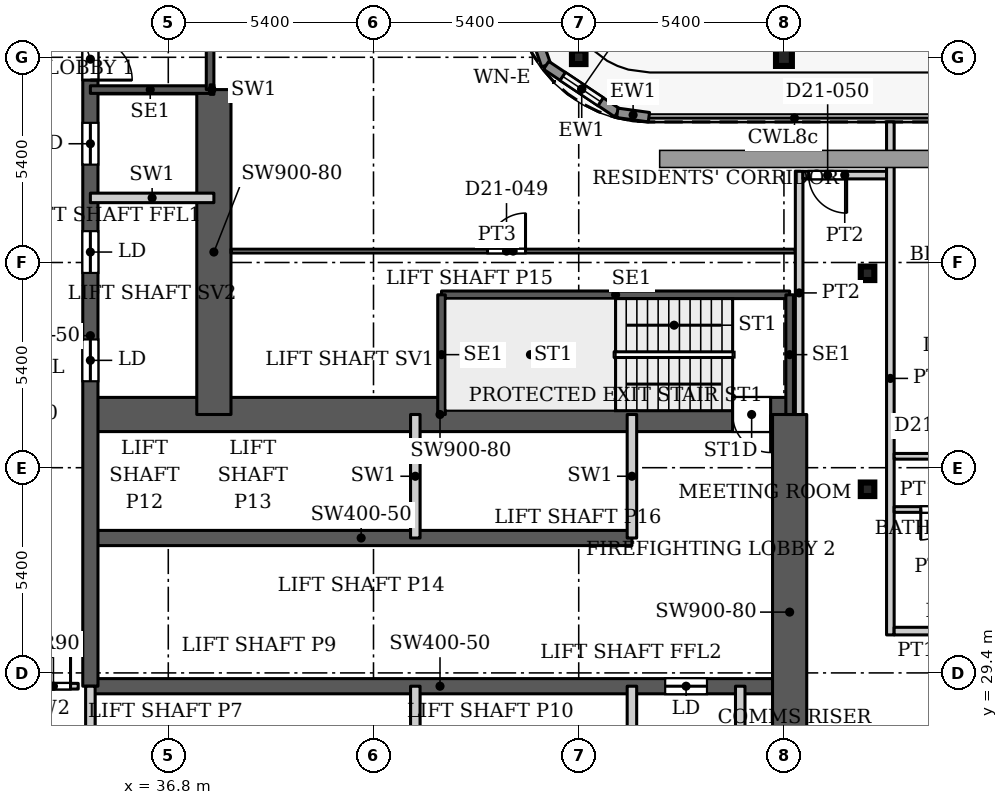
"""IFC4 building model, lengths in metres.
Left out: names, types, materials, properties, quantities, classifications, styles, units other than length and angle.
Written with IfcOpenShell. Run it as: python <this file> out.ifc"""

import sys

from ifc_helpers import new_model, si_unit, direction, frame, frame_2d, origin, origin_2d, place, context, subcontext, project, spatial, rectangle, hollow_rectangle, i_section, extrude, source, transform, mapped, element, fill, save


model = new_model("IFC4")
c1 = context("Model", 3, precision=1e-05, world=origin(), true_north=direction((0.0, 1.0)))
c2 = subcontext(c1, "Body", "Model", "MODEL_VIEW")
j1 = project(units=[si_unit("LENGTHUNIT", "METRE"), si_unit("PLANEANGLEUNIT", "RADIAN")], contexts=[c1])
p1 = place(None, origin())
s1 = spatial("IfcSite", under=j1, at=p1, CompositionType="ELEMENT")
p2 = place(p1, origin())
s2 = spatial("IfcBuilding", under=s1, at=p2, CompositionType="ELEMENT")
p3 = place(p2, frame((0.0, 0.0, 94.1)))
s3 = spatial("IfcBuildingStorey", under=s2, at=p3, CompositionType="ELEMENT", Elevation=94.1)
p4 = place(p3, frame((53.0, 45.6, 0.0), z_axis=(0.0, 0.0, 1.0), x_axis=(1.0, 0.0, 0.0)))
e1 = element("IfcColumn", 1, at=p4, inside=s3, PredefinedType="COLUMN", context=c2, shape_type="SweptSolid", body=[
    extrude(i_section(OverallWidth=0.418, OverallDepth=0.455, WebThickness=0.042, FlangeThickness=0.068, FilletRadius=0.014, at=origin_2d()), origin(), (0.0, 0.0, 1.0), 3.9),
])
for number, where, z_axis, x_axis in (
    (2, (55.2, 34.232, 0.0), (0.0, 0.0, 1.0), (1.0, 0.0, 0.0)),
    (3, (55.2, 39.916, 0.0), (0.0, 0.0, 1.0), (1.0, 0.0, 0.0)),
    (4, (47.6, 45.6, 0.0), (0.0, 0.0, 1.0), (1.0, 0.0, 0.0)),
):
    element("IfcColumn", number, at=place(p3, frame(where, z_axis=z_axis, x_axis=x_axis)), inside=s3, PredefinedType="COLUMN", context=c2, shape_type="SweptSolid", body=[
        extrude(hollow_rectangle(XDim=0.356, YDim=0.356, WallThickness=0.016, InnerFilletRadius=0.016, OuterFilletRadius=0.032, at=origin_2d()), origin(), (0.0, 0.0, 1.0), 3.9),
    ])
p5 = place(p3, frame((34.75, 29.05, 0.0), z_axis=(0.0, 0.0, 1.0), x_axis=(1.0, 0.0, 0.0)))
e5 = element("IfcWall", 5, at=p5, inside=s3, PredefinedType="SHEAR", context=c2, shape_type="SweptSolid", body=[
    extrude(rectangle(XDim=18.4, YDim=0.4, at=frame_2d((9.2, 0.0))), origin(), (0.0, 0.0, 1.0), 3.9),
])
p6 = place(p5, frame((15.125, 0.0, 0.0)))
e6 = element("IfcOpeningElement", 6, at=p6, cuts=e5, PredefinedType="OPENING", context=c2, shape_type="SweptSolid", body=[
    extrude(rectangle(XDim=1.1, YDim=2.2, at=frame_2d((0.55, 1.1))), frame((0.0, 0.21, 0.0), z_axis=(0.0, -1.0, 0.0), x_axis=(1.0, 0.0, 0.0)), (0.0, 0.0, 1.0), 0.42),
])
p7 = place(p3, frame((34.75, 32.95, 0.0), z_axis=(0.0, 0.0, 1.0), x_axis=(1.0, 0.0, 0.0)))
e7 = element("IfcWall", 7, at=p7, inside=s3, PredefinedType="SHEAR", context=c2, shape_type="SweptSolid", body=[
    extrude(rectangle(XDim=14.25, YDim=0.4, at=frame_2d((7.125, 0.0))), origin(), (0.0, 0.0, 1.0), 3.9),
])
p8 = place(p3, frame((34.75, 36.2, 0.0), z_axis=(0.0, 0.0, 1.0), x_axis=(1.0, 0.0, 0.0)))
e8 = element("IfcWall", 8, at=p8, inside=s3, PredefinedType="SHEAR", context=c2, shape_type="SweptSolid", body=[
    extrude(rectangle(XDim=18.4, YDim=0.9, at=frame_2d((9.2, 0.0))), origin(), (0.0, 0.0, 1.0), 3.9),
])
p9 = place(p8, frame((16.9, 0.0, 0.0)))
e9 = element("IfcOpeningElement", 9, at=p9, cuts=e8, PredefinedType="OPENING", context=c2, shape_type="SweptSolid", body=[
    extrude(rectangle(XDim=1.0, YDim=2.2, at=frame_2d((0.5, 1.1))), frame((0.0, 0.46, 0.0), z_axis=(0.0, -1.0, 0.0), x_axis=(1.0, 0.0, 0.0)), (0.0, 0.0, 1.0), 0.92),
])
p10 = place(p3, frame((34.75, 29.05, 0.0), z_axis=(0.0, 0.0, 1.0), x_axis=(0.0, 1.0, 0.0)))
e10 = element("IfcWall", 10, at=p10, inside=s3, PredefinedType="SHEAR", context=c2, shape_type="SweptSolid", body=[
    extrude(rectangle(XDim=18.45, YDim=0.4, at=frame_2d((9.225, 0.0))), origin(), (0.0, 0.0, 1.0), 3.9),
])
p11 = place(p10, frame((8.025, 0.0, 0.0)))
e11 = element("IfcOpeningElement", 11, at=p11, cuts=e10, PredefinedType="OPENING", context=c2, shape_type="SweptSolid", body=[
    extrude(rectangle(XDim=1.1, YDim=2.2, at=frame_2d((0.55, 1.1))), frame((0.0, 0.21, 0.0), z_axis=(0.0, -1.0, 0.0), x_axis=(1.0, 0.0, 0.0)), (0.0, 0.0, 1.0), 0.42),
])
p12 = place(p10, frame((10.875, 0.0, 0.0)))
e12 = element("IfcOpeningElement", 12, at=p12, cuts=e10, PredefinedType="OPENING", context=c2, shape_type="SweptSolid", body=[
    extrude(rectangle(XDim=1.1, YDim=2.2, at=frame_2d((0.55, 1.1))), frame((0.0, 0.21, 0.0), z_axis=(0.0, -1.0, 0.0), x_axis=(1.0, 0.0, 0.0)), (0.0, 0.0, 1.0), 0.42),
])
p13 = place(p10, frame((13.725, 0.0, 0.0)))
e13 = element("IfcOpeningElement", 13, at=p13, cuts=e10, PredefinedType="OPENING", context=c2, shape_type="SweptSolid", body=[
    extrude(rectangle(XDim=1.1, YDim=2.2, at=frame_2d((0.55, 1.1))), frame((0.0, 0.21, 0.0), z_axis=(0.0, -1.0, 0.0), x_axis=(1.0, 0.0, 0.0)), (0.0, 0.0, 1.0), 0.42),
])
p14 = place(p10, frame((15.95, 0.0, 0.0)))
e14 = element("IfcOpeningElement", 14, at=p14, cuts=e10, PredefinedType="OPENING", context=c2, shape_type="SweptSolid", body=[
    extrude(rectangle(XDim=1.1, YDim=2.2, at=frame_2d((0.55, 1.1))), frame((0.0, 0.21, 0.0), z_axis=(0.0, -1.0, 0.0), x_axis=(1.0, 0.0, 0.0)), (0.0, 0.0, 1.0), 0.42),
])
p15 = place(p3, frame((38.0, 36.2, 0.0), z_axis=(0.0, 0.0, 1.0), x_axis=(0.0, 1.0, 0.0)))
e15 = element("IfcWall", 15, at=p15, inside=s3, PredefinedType="SHEAR", context=c2, shape_type="SweptSolid", body=[
    extrude(rectangle(XDim=8.55, YDim=0.9, at=frame_2d((4.275, 0.0))), origin(), (0.0, 0.0, 1.0), 3.9),
])
p16 = place(p3, frame((53.15, 25.8, 0.0), z_axis=(0.0, 0.0, 1.0), x_axis=(0.0, 1.0, 0.0)))
e16 = element("IfcWall", 16, at=p16, inside=s3, PredefinedType="SHEAR", context=c2, shape_type="SweptSolid", body=[
    extrude(rectangle(XDim=10.4, YDim=0.9, at=frame_2d((5.2, 0.0))), origin(), (0.0, 0.0, 1.0), 3.9),
])
p17 = place(p3, frame((46.018, 47.471, 0.0), z_axis=(0.0, 0.0, 1.0), x_axis=(0.328791208903, -0.944402637093, 0.0)))
e17 = element("IfcWall", 17, at=p17, inside=s3, PredefinedType="SOLIDWALL", context=c2, shape_type="SweptSolid", body=[
    extrude(rectangle(XDim=2.205, YDim=0.25, at=frame_2d((1.102, 0.0))), origin(), (0.0, 0.0, 1.0), 3.75),
])
p18 = place(p17, frame((0.503, 0.0, 0.6)))
e18 = element("IfcOpeningElement", 18, at=p18, cuts=e17, PredefinedType="OPENING", context=c2, shape_type="SweptSolid", body=[
    extrude(rectangle(XDim=1.2, YDim=2.1, at=frame_2d((0.6, 1.05))), frame((0.0, 0.135, 0.0), z_axis=(0.0, -1.0, 0.0), x_axis=(1.0, 0.0, 0.0)), (0.0, 0.0, 1.0), 0.27),
])
p19 = place(p3, frame((46.743, 45.389, 0.0), z_axis=(0.0, 0.0, 1.0), x_axis=(0.831449265529, -0.555600682912, 0.0)))
e19 = element("IfcWall", 19, at=p19, inside=s3, PredefinedType="SOLIDWALL", context=c2, shape_type="SweptSolid", body=[
    extrude(rectangle(XDim=2.251, YDim=0.25, at=frame_2d((1.126, 0.0))), origin(), (0.0, 0.0, 1.0), 3.75),
])
p20 = place(p19, frame((0.525, 0.0, 0.6)))
e20 = element("IfcOpeningElement", 20, at=p20, cuts=e19, PredefinedType="OPENING", context=c2, shape_type="SweptSolid", body=[
    extrude(rectangle(XDim=1.2, YDim=2.1, at=frame_2d((0.6, 1.05))), frame((0.0, 0.135, 0.0), z_axis=(0.0, -1.0, 0.0), x_axis=(1.0, 0.0, 0.0)), (0.0, 0.0, 1.0), 0.27),
])
p21 = place(p3, frame((48.615, 44.138, 0.0), z_axis=(0.0, 0.0, 1.0), x_axis=(0.990741504246, -0.135761819977, 0.0)))
e21 = element("IfcWall", 21, at=p21, inside=s3, PredefinedType="SOLIDWALL", context=c2, shape_type="SweptSolid", body=[
    extrude(rectangle(XDim=0.84, YDim=0.25, at=frame_2d((0.42, 0.0))), origin(), (0.0, 0.0, 1.0), 3.75),
])
p22 = place(p3, frame((43.99, 39.35, 0.0), z_axis=(0.0, 0.0, 1.0), x_axis=(1.0, 0.0, 0.0)))
e22 = element("IfcWall", 22, at=p22, inside=s3, PredefinedType="SHEAR", context=c2, shape_type="SweptSolid", body=[
    extrude(rectangle(XDim=9.16, YDim=0.2, at=frame_2d((4.58, 0.0))), origin(), (0.0, 0.0, 1.0), 3.9),
])
for number, where, z_axis, x_axis in (
    (23, (43.99, 36.2, 0.0), (0.0, 0.0, 1.0), (0.0, 1.0, 0.0)),
    (24, (53.15, 36.2, 0.0), (0.0, 0.0, 1.0), (0.0, 1.0, 0.0)),
):
    element("IfcWall", number, at=place(p3, frame(where, z_axis=z_axis, x_axis=x_axis)), inside=s3, PredefinedType="SHEAR", context=c2, shape_type="SweptSolid", body=[
        extrude(rectangle(XDim=3.15, YDim=0.2, at=frame_2d((1.575, 0.0))), origin(), (0.0, 0.0, 1.0), 3.9),
    ])
p23 = place(p3, frame((34.75, 44.75, 0.0), z_axis=(0.0, 0.0, 1.0), x_axis=(1.0, 0.0, 0.0)))
e25 = element("IfcWall", 25, at=p23, inside=s3, PredefinedType="SHEAR", context=c2, shape_type="SweptSolid", body=[
    extrude(rectangle(XDim=3.15, YDim=0.2, at=frame_2d((1.575, 0.0))), origin(), (0.0, 0.0, 1.0), 3.9),
])
p24 = place(p3, frame((37.9, 44.75, 0.0), z_axis=(0.0, 0.0, 1.0), x_axis=(0.0, 1.0, 0.0)))
e26 = element("IfcWall", 26, at=p24, inside=s3, PredefinedType="SHEAR", context=c2, shape_type="SweptSolid", body=[
    extrude(rectangle(XDim=9.16, YDim=0.2, at=frame_2d((4.58, 0.0))), origin(), (0.0, 0.0, 1.0), 3.9),
])
for number, where, z_axis, x_axis in (
    (27, (34.75, 25.8, 0.0), (0.0, 0.0, 1.0), (0.0, 1.0, 0.0)),
    (28, (43.3, 25.8, 0.0), (0.0, 0.0, 1.0), (0.0, 1.0, 0.0)),
    (29, (43.3, 32.95, 0.0), (0.0, 0.0, 1.0), (0.0, 1.0, 0.0)),
    (30, (49.0, 25.8, 0.0), (0.0, 0.0, 1.0), (0.0, 1.0, 0.0)),
    (31, (49.0, 32.95, 0.0), (0.0, 0.0, 1.0), (0.0, 1.0, 0.0)),
    (32, (51.85, 25.8, 0.0), (0.0, 0.0, 1.0), (0.0, 1.0, 0.0)),
    (33, (34.75, 41.9, 0.0), (0.0, 0.0, 1.0), (1.0, 0.0, 0.0)),
):
    element("IfcWall", number, at=place(p3, frame(where, z_axis=z_axis, x_axis=x_axis)), inside=s3, PredefinedType="PARTITIONING", context=c2, shape_type="SweptSolid", body=[
        extrude(rectangle(XDim=3.25, YDim=0.25, at=frame_2d((1.625, 0.0))), origin(), (0.0, 0.0, 1.0), 3.9),
    ])
p25 = place(p3, frame((37.9, 44.75, 0.0), z_axis=(0.0, 0.0, 1.0), x_axis=(1.0, 0.0, 0.0)))
e34 = element("IfcWall", 34, at=p25, inside=s3, PredefinedType="PARTITIONING", context=c2, shape_type="SweptSolid", body=[
    extrude(rectangle(XDim=0.1, YDim=0.25, at=frame_2d((0.05, 0.0))), origin(), (0.0, 0.0, 1.0), 3.9),
])
p26 = place(p3, frame((32.805, 29.05, 0.0), z_axis=(0.0, 0.0, 1.0), x_axis=(1.0, 0.0, 0.0)))
e35 = element("IfcWall", 35, at=p26, inside=s3, PredefinedType="PARTITIONING", context=c2, shape_type="SweptSolid", body=[
    extrude(rectangle(XDim=1.625, YDim=0.15, at=frame_2d((0.812, 0.0))), origin(), (0.0, 0.0, 1.0), 3.9),
])
p27 = place(p26, frame((0.523, 0.0, 0.0)))
e36 = element("IfcOpeningElement", 36, at=p27, cuts=e35, PredefinedType="OPENING", context=c2, shape_type="SweptSolid", body=[
    extrude(rectangle(XDim=0.9, YDim=2.2, at=frame_2d((0.45, 1.1))), frame((0.0, 0.085, 0.0), z_axis=(0.0, -1.0, 0.0), x_axis=(1.0, 0.0, 0.0)), (0.0, 0.0, 1.0), 0.17),
])
p28 = place(p3, frame((38.449, 40.5, 0.0), z_axis=(0.0, 0.0, 1.0), x_axis=(1.0, 0.0, 0.0)))
e37 = element("IfcWall", 37, at=p28, inside=s3, PredefinedType="PARTITIONING", context=c2, shape_type="SweptSolid", body=[
    extrude(rectangle(XDim=14.851, YDim=0.1, at=frame_2d((7.426, 0.0))), origin(), (0.0, 0.0, 1.0), 3.6),
])
p29 = place(p28, frame((6.751, 0.0, 0.0)))
e38 = element("IfcOpeningElement", 38, at=p29, cuts=e37, PredefinedType="OPENING", context=c2, shape_type="SweptSolid", body=[
    extrude(rectangle(XDim=1.0, YDim=2.1, at=frame_2d((0.5, 1.05))), frame((0.0, 0.06, 0.0), z_axis=(0.0, -1.0, 0.0), x_axis=(1.0, 0.0, 0.0)), (0.0, 0.0, 1.0), 0.12),
])
p30 = place(p3, frame((53.4, 36.199, 0.0), z_axis=(0.0, 0.0, 1.0), x_axis=(0.0, 1.0, 0.0)))
e39 = element("IfcWall", 39, at=p30, inside=s3, PredefinedType="PARTITIONING", context=c2, shape_type="SweptSolid", body=[
    extrude(rectangle(XDim=6.401, YDim=0.2, at=frame_2d((3.201, 0.0))), origin(), (0.0, 0.0, 1.0), 3.6),
])
p31 = place(p3, frame((53.5, 42.5, 0.0), z_axis=(0.0, 0.0, 1.0), x_axis=(1.0, 0.0, 0.0)))
e40 = element("IfcWall", 40, at=p31, inside=s3, PredefinedType="PARTITIONING", context=c2, shape_type="SweptSolid", body=[
    extrude(rectangle(XDim=2.2, YDim=0.2, at=frame_2d((1.1, 0.0))), origin(), (0.0, 0.0, 1.0), 3.6),
])
p32 = place(p31, frame((0.15, 0.0, 0.0)))
e41 = element("IfcOpeningElement", 41, at=p32, cuts=e40, PredefinedType="OPENING", context=c2, shape_type="SweptSolid", body=[
    extrude(rectangle(XDim=1.0, YDim=2.1, at=frame_2d((0.5, 1.05))), frame((0.0, 0.11, 0.0), z_axis=(0.0, -1.0, 0.0), x_axis=(1.0, 0.0, 0.0)), (0.0, 0.0, 1.0), 0.22),
])
p33 = place(p3, frame((55.8, 30.4, 0.0), z_axis=(0.0, 0.0, 1.0), x_axis=(0.0, 1.0, 0.0)))
e42 = element("IfcWall", 42, at=p33, inside=s3, PredefinedType="PARTITIONING", context=c2, shape_type="SweptSolid", body=[
    extrude(rectangle(XDim=13.5, YDim=0.2, at=frame_2d((6.75, 0.0))), origin(), (0.0, 0.0, 1.0), 3.6),
])
p34 = place(p3, frame((55.9, 30.5, 0.0), z_axis=(0.0, 0.0, 1.0), x_axis=(1.0, 0.0, 0.0)))
e43 = element("IfcWall", 43, at=p34, inside=s3, PredefinedType="PARTITIONING", context=c2, shape_type="SweptSolid", body=[
    extrude(rectangle(XDim=42.2, YDim=0.2, at=frame_2d((21.1, 0.0))), origin(), (0.0, 0.0, 1.0), 3.6),
])
p35 = place(p34, frame((2.7, 0.0, 0.0)))
e44 = element("IfcOpeningElement", 44, at=p35, cuts=e43, PredefinedType="OPENING", context=c2, shape_type="SweptSolid", body=[
    extrude(rectangle(XDim=1.0, YDim=2.1, at=frame_2d((0.5, 1.05))), frame((0.0, 0.11, 0.0), z_axis=(0.0, -1.0, 0.0), x_axis=(1.0, 0.0, 0.0)), (0.0, 0.0, 1.0), 0.22),
])
p36 = place(p34, frame((15.3, 0.0, 0.0)))
e45 = element("IfcOpeningElement", 45, at=p36, cuts=e43, PredefinedType="OPENING", context=c2, shape_type="SweptSolid", body=[
    extrude(rectangle(XDim=1.0, YDim=2.1, at=frame_2d((0.5, 1.05))), frame((0.0, 0.11, 0.0), z_axis=(0.0, -1.0, 0.0), x_axis=(1.0, 0.0, 0.0)), (0.0, 0.0, 1.0), 0.22),
])
p37 = place(p34, frame((33.3, 0.0, 0.0)))
e46 = element("IfcOpeningElement", 46, at=p37, cuts=e43, PredefinedType="OPENING", context=c2, shape_type="SweptSolid", body=[
    extrude(rectangle(XDim=1.0, YDim=2.1, at=frame_2d((0.5, 1.05))), frame((0.0, 0.11, 0.0), z_axis=(0.0, -1.0, 0.0), x_axis=(1.0, 0.0, 0.0)), (0.0, 0.0, 1.0), 0.22),
])
p38 = place(p3, frame((55.9, 33.7, 0.0), z_axis=(0.0, 0.0, 1.0), x_axis=(1.0, 0.0, 0.0)))
e47 = element("IfcWall", 47, at=p38, inside=s3, PredefinedType="PARTITIONING", context=c2, shape_type="SweptSolid", body=[
    extrude(rectangle(XDim=2.225, YDim=0.15, at=frame_2d((1.113, 0.0))), origin(), (0.0, 0.0, 1.0), 3.6),
])
p39 = place(p38, frame((0.7, 0.0, 0.0)))
e48 = element("IfcOpeningElement", 48, at=p39, cuts=e47, PredefinedType="OPENING", context=c2, shape_type="SweptSolid", body=[
    extrude(rectangle(XDim=0.8, YDim=2.1, at=frame_2d((0.4, 1.05))), frame((0.0, 0.085, 0.0), z_axis=(0.0, -1.0, 0.0), x_axis=(1.0, 0.0, 0.0)), (0.0, 0.0, 1.0), 0.17),
])
p40 = place(p3, frame((55.9, 35.1, 0.0), z_axis=(0.0, 0.0, 1.0), x_axis=(1.0, 0.0, 0.0)))
e49 = element("IfcWall", 49, at=p40, inside=s3, PredefinedType="PARTITIONING", context=c2, shape_type="SweptSolid", body=[
    extrude(rectangle(XDim=11.2, YDim=0.15, at=frame_2d((5.6, 0.0))), origin(), (0.0, 0.0, 1.0), 3.6),
])
p41 = place(p40, frame((1.4, 0.0, 0.0)))
e50 = element("IfcOpeningElement", 50, at=p41, cuts=e49, PredefinedType="OPENING", context=c2, shape_type="SweptSolid", body=[
    extrude(rectangle(XDim=0.9, YDim=2.1, at=frame_2d((0.45, 1.05))), frame((0.0, 0.085, 0.0), z_axis=(0.0, -1.0, 0.0), x_axis=(1.0, 0.0, 0.0)), (0.0, 0.0, 1.0), 0.17),
])
p42 = place(p40, frame((5.1, 0.0, 0.0)))
e51 = element("IfcOpeningElement", 51, at=p42, cuts=e49, PredefinedType="OPENING", context=c2, shape_type="SweptSolid", body=[
    extrude(rectangle(XDim=1.0, YDim=2.1, at=frame_2d((0.5, 1.05))), frame((0.0, 0.085, 0.0), z_axis=(0.0, -1.0, 0.0), x_axis=(1.0, 0.0, 0.0)), (0.0, 0.0, 1.0), 0.17),
])
p43 = place(p40, frame((7.85, 0.0, 0.0)))
e52 = element("IfcOpeningElement", 52, at=p43, cuts=e49, PredefinedType="OPENING", context=c2, shape_type="SweptSolid", body=[
    extrude(rectangle(XDim=0.9, YDim=2.1, at=frame_2d((0.45, 1.05))), frame((0.0, 0.085, 0.0), z_axis=(0.0, -1.0, 0.0), x_axis=(1.0, 0.0, 0.0)), (0.0, 0.0, 1.0), 0.17),
])
m1 = source(origin(), c2, "Body", "SweptSolid", [
    extrude(rectangle(XDim=1.2, YDim=2.1, at=frame_2d((0.6, 1.05))), frame((0.0, 0.03, 0.0), z_axis=(0.0, -1.0, 0.0), x_axis=(1.0, 0.0, 0.0)), (0.0, 0.0, 1.0), 0.06),
])
p44 = place(p20, origin())
e53 = element("IfcWindow", 53, at=p44, inside=s3, PartitioningType="SINGLE_PANEL", PredefinedType="WINDOW", context=c2, shape_type="MappedRepresentation", body=[
    mapped(m1, transform((0.0, 0.0, 0.0), x_axis=(1.0, 0.0, 0.0), y_axis=(0.0, 1.0, 0.0), z_axis=(0.0, 0.0, 1.0), scale=1.0)),
])
fill(e20, e53)
m2 = source(origin(), c2, "Body", "SweptSolid", [
    extrude(rectangle(XDim=1.1, YDim=2.2, at=frame_2d((0.55, 1.1))), frame((0.0, 0.025, 0.0), z_axis=(0.0, -1.0, 0.0), x_axis=(1.0, 0.0, 0.0)), (0.0, 0.0, 1.0), 0.05),
])
p45 = place(p11, origin())
e54 = element("IfcDoor", 54, at=p45, inside=s3, OperationType="SLIDING_TO_LEFT", PredefinedType="DOOR", context=c2, shape_type="MappedRepresentation", body=[
    mapped(m2, transform((0.0, 0.0, 0.0), x_axis=(1.0, 0.0, 0.0), y_axis=(0.0, 1.0, 0.0), z_axis=(0.0, 0.0, 1.0), scale=1.0)),
])
fill(e11, e54)
p46 = place(p12, origin())
e55 = element("IfcDoor", 55, at=p46, inside=s3, OperationType="SLIDING_TO_LEFT", PredefinedType="DOOR", context=c2, shape_type="MappedRepresentation", body=[
    mapped(m2, transform((0.0, 0.0, 0.0), x_axis=(1.0, 0.0, 0.0), y_axis=(0.0, 1.0, 0.0), z_axis=(0.0, 0.0, 1.0), scale=1.0)),
])
fill(e12, e55)
p47 = place(p13, origin())
e56 = element("IfcDoor", 56, at=p47, inside=s3, OperationType="SLIDING_TO_LEFT", PredefinedType="DOOR", context=c2, shape_type="MappedRepresentation", body=[
    mapped(m2, transform((0.0, 0.0, 0.0), x_axis=(1.0, 0.0, 0.0), y_axis=(0.0, 1.0, 0.0), z_axis=(0.0, 0.0, 1.0), scale=1.0)),
])
fill(e13, e56)
p48 = place(p6, origin())
e57 = element("IfcDoor", 57, at=p48, inside=s3, OperationType="SLIDING_TO_LEFT", PredefinedType="DOOR", context=c2, shape_type="MappedRepresentation", body=[
    mapped(m2, transform((0.0, 0.0, 0.0), x_axis=(1.0, 0.0, 0.0), y_axis=(0.0, 1.0, 0.0), z_axis=(0.0, 0.0, 1.0), scale=1.0)),
])
fill(e6, e57)
m3 = source(origin(), c2, "Body", "SweptSolid", [
    extrude(rectangle(XDim=0.9, YDim=2.2, at=frame_2d((0.45, 1.1))), frame((0.0, 0.025, 0.0), z_axis=(0.0, -1.0, 0.0), x_axis=(1.0, 0.0, 0.0)), (0.0, 0.0, 1.0), 0.05),
])
p49 = place(p27, origin())
e58 = element("IfcDoor", 58, at=p49, inside=s3, OperationType="SINGLE_SWING_LEFT", PredefinedType="DOOR", context=c2, shape_type="MappedRepresentation", body=[
    mapped(m3, transform((0.0, 0.0, 0.0), x_axis=(1.0, 0.0, 0.0), y_axis=(0.0, 1.0, 0.0), z_axis=(0.0, 0.0, 1.0), scale=1.0)),
])
fill(e36, e58)
m4 = source(origin(), c2, "Body", "SweptSolid", [
    extrude(rectangle(XDim=1.0, YDim=2.2, at=frame_2d((0.5, 1.1))), frame((0.0, 0.025, 0.0), z_axis=(0.0, -1.0, 0.0), x_axis=(1.0, 0.0, 0.0)), (0.0, 0.0, 1.0), 0.05),
])
p50 = place(p9, origin())
e59 = element("IfcDoor", 59, at=p50, inside=s3, OperationType="SINGLE_SWING_RIGHT", PredefinedType="DOOR", context=c2, shape_type="MappedRepresentation", body=[
    mapped(m4, transform((0.0, 0.0, 0.0), x_axis=(1.0, 0.0, 0.0), y_axis=(0.0, 1.0, 0.0), z_axis=(0.0, 0.0, 1.0), scale=1.0)),
])
fill(e9, e59)
m5 = source(origin(), c2, "Body", "SweptSolid", [
    extrude(rectangle(XDim=1.1, YDim=2.2, at=frame_2d((0.55, 1.1))), frame((0.0, 0.025, 0.0), z_axis=(0.0, -1.0, 0.0), x_axis=(1.0, 0.0, 0.0)), (0.0, 0.0, 1.0), 0.05),
])
p51 = place(p14, origin())
e60 = element("IfcDoor", 60, at=p51, inside=s3, OperationType="SINGLE_SWING_RIGHT", PredefinedType="DOOR", context=c2, shape_type="MappedRepresentation", body=[
    mapped(m5, transform((0.0, 0.0, 0.0), x_axis=(1.0, 0.0, 0.0), y_axis=(0.0, 1.0, 0.0), z_axis=(0.0, 0.0, 1.0), scale=1.0)),
])
fill(e14, e60)
m6 = source(origin(), c2, "Body", "SweptSolid", [
    extrude(rectangle(XDim=0.8, YDim=2.1, at=frame_2d((0.4, 1.05))), frame((0.0, 0.025, 0.0), z_axis=(0.0, -1.0, 0.0), x_axis=(1.0, 0.0, 0.0)), (0.0, 0.0, 1.0), 0.05),
])
p52 = place(p39, origin())
e61 = element("IfcDoor", 61, at=p52, inside=s3, OperationType="SINGLE_SWING_RIGHT", PredefinedType="DOOR", context=c2, shape_type="MappedRepresentation", body=[
    mapped(m6, transform((0.0, 0.0, 0.0), x_axis=(1.0, 0.0, 0.0), y_axis=(0.0, 1.0, 0.0), z_axis=(0.0, 0.0, 1.0), scale=1.0)),
])
fill(e48, e61)
m7 = source(origin(), c2, "Body", "SweptSolid", [
    extrude(rectangle(XDim=1.0, YDim=2.1, at=frame_2d((0.5, 1.05))), frame((0.0, 0.025, 0.0), z_axis=(0.0, -1.0, 0.0), x_axis=(1.0, 0.0, 0.0)), (0.0, 0.0, 1.0), 0.05),
])
p53 = place(p29, origin())
e62 = element("IfcDoor", 62, at=p53, inside=s3, OperationType="SINGLE_SWING_LEFT", PredefinedType="DOOR", context=c2, shape_type="MappedRepresentation", body=[
    mapped(m7, transform((0.0, 0.0, 0.0), x_axis=(1.0, 0.0, 0.0), y_axis=(0.0, 1.0, 0.0), z_axis=(0.0, 0.0, 1.0), scale=1.0)),
])
fill(e38, e62)
m8 = source(origin(), c2, "Body", "SweptSolid", [
    extrude(rectangle(XDim=1.0, YDim=2.1, at=frame_2d((0.5, 1.05))), frame((0.0, 0.025, 0.0), z_axis=(0.0, -1.0, 0.0), x_axis=(1.0, 0.0, 0.0)), (0.0, 0.0, 1.0), 0.05),
])
p54 = place(p32, origin())
e63 = element("IfcDoor", 63, at=p54, inside=s3, OperationType="SINGLE_SWING_RIGHT", PredefinedType="DOOR", context=c2, shape_type="MappedRepresentation", body=[
    mapped(m8, transform((0.0, 0.0, 0.0), x_axis=(1.0, 0.0, 0.0), y_axis=(0.0, 1.0, 0.0), z_axis=(0.0, 0.0, 1.0), scale=1.0)),
])
fill(e41, e63)
save(model, sys.argv[1])
